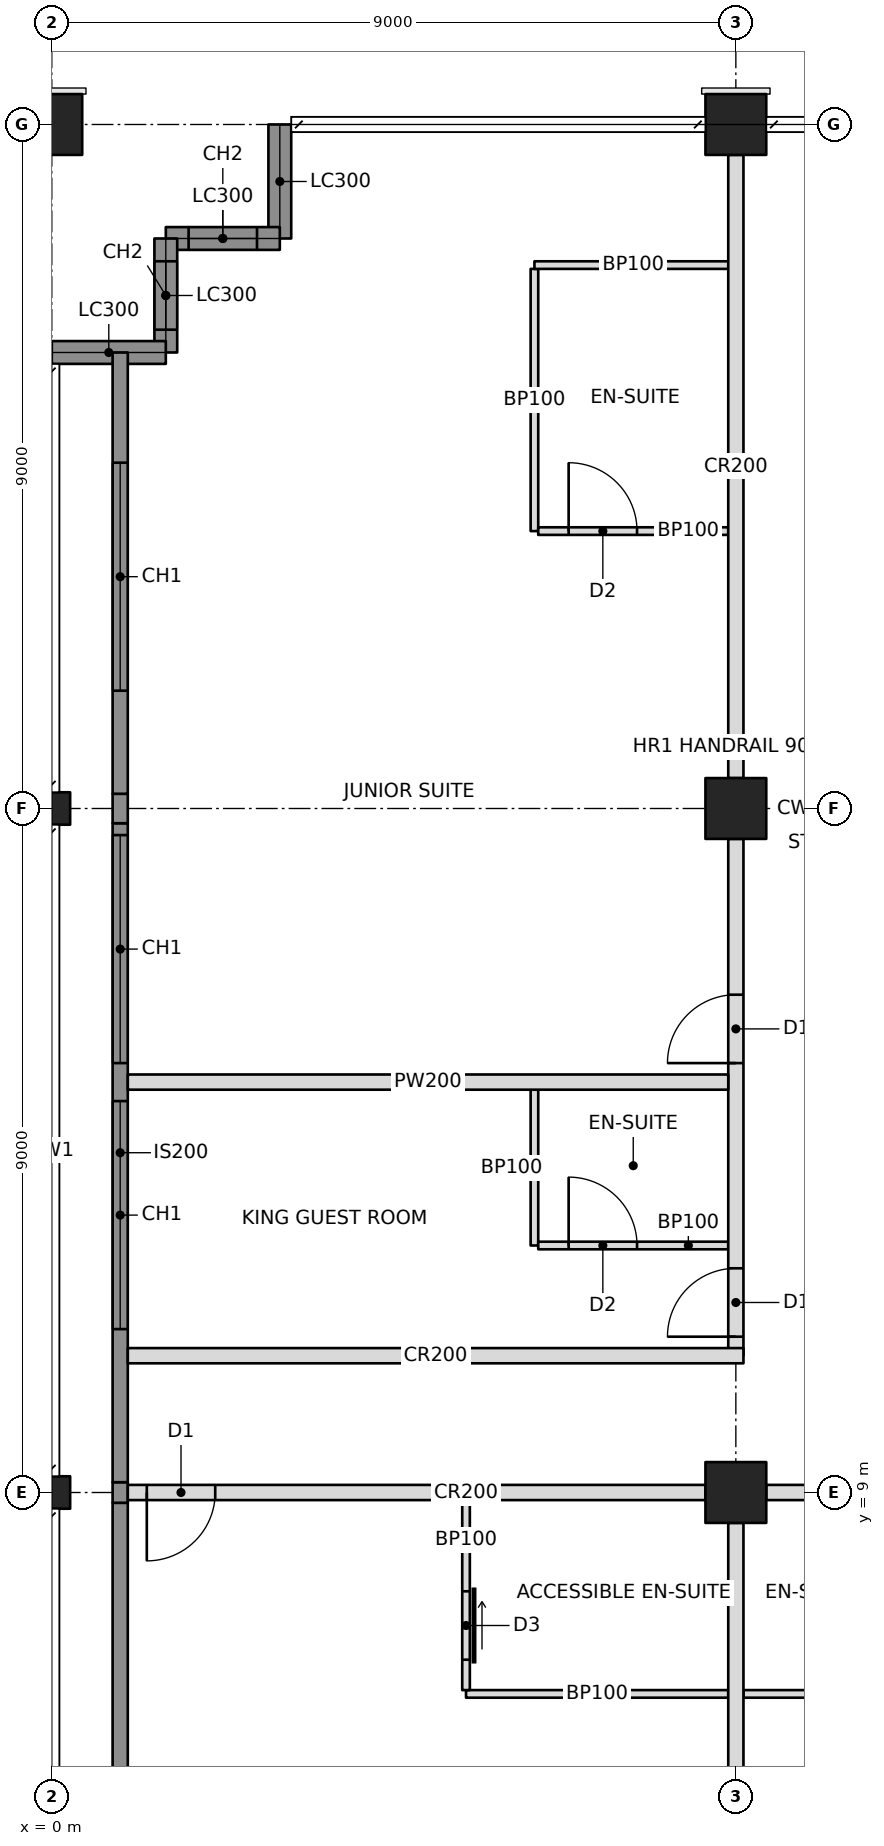
"""IFC4 building model, lengths in metres.
Left out: names, types, materials, properties, quantities, classifications, styles, units other than length and angle.
Written with IfcOpenShell. Run it as: python <this file> out.ifc"""

import sys

from ifc_helpers import new_model, si_unit, direction, frame, frame_2d, origin, origin_2d, place, context, subcontext, project, spatial, rectangle, hollow_rectangle, i_section, extrude, element, fill, save


model = new_model("IFC4")
c1 = context("Model", 3, precision=1e-05, world=origin(), true_north=direction((0.0, 1.0)))
c2 = subcontext(c1, "Body", "Model", "MODEL_VIEW")
j1 = project(units=[si_unit("LENGTHUNIT", "METRE"), si_unit("PLANEANGLEUNIT", "RADIAN")], contexts=[c1])
p1 = place(None, origin())
s1 = spatial("IfcSite", under=j1, at=p1, CompositionType="ELEMENT")
p2 = place(p1, origin())
s2 = spatial("IfcBuilding", under=s1, at=p2, CompositionType="ELEMENT")
p3 = place(p2, frame((0.0, 0.0, 211.4)))
s3 = spatial("IfcBuildingStorey", under=s2, at=p3, CompositionType="ELEMENT", Elevation=211.4)
for number, where, z_axis, x_axis in (
    (1, (0.0, 9.0, 0.0), (0.0, 0.0, 1.0), (0.0, 1.0, 0.0)),
    (2, (0.0, 18.0, 0.0), (0.0, 0.0, 1.0), (0.0, 1.0, 0.0)),
):
    element("IfcColumn", number, at=place(p3, frame(where, z_axis=z_axis, x_axis=x_axis)), inside=s3, PredefinedType="COLUMN", context=c2, shape_type="SweptSolid", body=[
        extrude(i_section(OverallWidth=0.427, OverallDepth=0.483, WebThickness=0.051, FlangeThickness=0.082, at=origin_2d()), origin(), (0.0, 0.0, 1.0), 3.4),
    ])
p4 = place(p3, frame((0.0, 27.0, 0.0), z_axis=(0.0, 0.0, 1.0), x_axis=(0.0, 1.0, 0.0)))
e3 = element("IfcColumn", 3, at=p4, inside=s3, PredefinedType="COLUMN", context=c2, shape_type="SweptSolid", body=[
    extrude(hollow_rectangle(XDim=0.8, YDim=0.8, WallThickness=0.06, at=origin_2d()), origin(), (0.0, 0.0, 1.0), 3.4),
])
for number, where, z_axis, x_axis in (
    (4, (9.0, 9.0, 0.0), (0.0, 0.0, 1.0), (1.0, 0.0, 0.0)),
    (5, (9.0, 18.0, 0.0), (0.0, 0.0, 1.0), (1.0, 0.0, 0.0)),
):
    element("IfcColumn", number, at=place(p3, frame(where, z_axis=z_axis, x_axis=x_axis)), inside=s3, PredefinedType="COLUMN", context=c2, shape_type="SweptSolid", body=[
        extrude(hollow_rectangle(XDim=0.8, YDim=0.8, WallThickness=0.05, at=origin_2d()), origin(), (0.0, 0.0, 1.0), 3.4),
    ])
p5 = place(p3, frame((9.0, 27.0, 0.0), z_axis=(0.0, 0.0, 1.0), x_axis=(1.0, 0.0, 0.0)))
e6 = element("IfcColumn", 6, at=p5, inside=s3, PredefinedType="COLUMN", context=c2, shape_type="SweptSolid", body=[
    extrude(hollow_rectangle(XDim=0.8, YDim=0.8, WallThickness=0.06, at=origin_2d()), origin(), (0.0, 0.0, 1.0), 3.4),
])
p6 = place(p3, frame((3.0, 27.0, 0.0), z_axis=(0.0, 0.0, 1.0), x_axis=(0.0, -1.0, 0.0)))
e7 = element("IfcWall", 7, at=p6, inside=s3, PredefinedType="SOLIDWALL", context=c2, shape_type="SweptSolid", body=[
    extrude(rectangle(XDim=1.5, YDim=0.3, at=frame_2d((0.75, 0.0))), origin(), (0.0, 0.0, 1.0), 2.42),
])
p7 = place(p3, frame((3.0, 25.5, 0.0), z_axis=(0.0, 0.0, 1.0), x_axis=(-1.0, 0.0, 0.0)))
e8 = element("IfcWall", 8, at=p7, inside=s3, PredefinedType="SOLIDWALL", context=c2, shape_type="SweptSolid", body=[
    extrude(rectangle(XDim=1.5, YDim=0.3, at=frame_2d((0.75, 0.0))), origin(), (0.0, 0.0, 1.0), 3.2),
])
p8 = place(p7, frame((0.3, 0.0, 0.6)))
e9 = element("IfcOpeningElement", 9, at=p8, cuts=e8, PredefinedType="OPENING", context=c2, shape_type="SweptSolid", body=[
    extrude(rectangle(XDim=0.9, YDim=2.2, at=frame_2d((0.45, 1.1))), frame((0.0, 0.16, 0.0), z_axis=(0.0, -1.0, 0.0), x_axis=(1.0, 0.0, 0.0)), (0.0, 0.0, 1.0), 0.32),
])
p9 = place(p3, frame((1.5, 25.5, 0.0), z_axis=(0.0, 0.0, 1.0), x_axis=(0.0, -1.0, 0.0)))
e10 = element("IfcWall", 10, at=p9, inside=s3, PredefinedType="SOLIDWALL", context=c2, shape_type="SweptSolid", body=[
    extrude(rectangle(XDim=1.5, YDim=0.3, at=frame_2d((0.75, 0.0))), origin(), (0.0, 0.0, 1.0), 3.2),
])
p10 = place(p9, frame((0.3, 0.0, 0.6)))
e11 = element("IfcOpeningElement", 11, at=p10, cuts=e10, PredefinedType="OPENING", context=c2, shape_type="SweptSolid", body=[
    extrude(rectangle(XDim=0.9, YDim=2.2, at=frame_2d((0.45, 1.1))), frame((0.0, 0.16, 0.0), z_axis=(0.0, -1.0, 0.0), x_axis=(1.0, 0.0, 0.0)), (0.0, 0.0, 1.0), 0.32),
])
p11 = place(p3, frame((1.5, 24.0, 0.0), z_axis=(0.0, 0.0, 1.0), x_axis=(-1.0, 0.0, 0.0)))
e12 = element("IfcWall", 12, at=p11, inside=s3, PredefinedType="SOLIDWALL", context=c2, shape_type="SweptSolid", body=[
    extrude(rectangle(XDim=1.5, YDim=0.3, at=frame_2d((0.75, 0.0))), origin(), (0.0, 0.0, 1.0), 2.42),
])
p12 = place(p3, frame((1.0, 9.0, 0.0), z_axis=(0.0, 0.0, 1.0), x_axis=(1.0, 0.0, 0.0)))
e13 = element("IfcWall", 13, at=p12, inside=s3, PredefinedType="PARTITIONING", context=c2, shape_type="SweptSolid", body=[
    extrude(rectangle(XDim=7.6, YDim=0.2, at=frame_2d((3.8, 0.0))), origin(), (0.0, 0.0, 1.0), 2.438),
])
p13 = place(p12, frame((0.25, 0.0, 0.0)))
e14 = element("IfcOpeningElement", 14, at=p13, cuts=e13, PredefinedType="OPENING", context=c2, shape_type="SweptSolid", body=[
    extrude(rectangle(XDim=0.9, YDim=2.1, at=frame_2d((0.45, 1.05))), frame((0.0, 0.11, 0.0), z_axis=(0.0, -1.0, 0.0), x_axis=(1.0, 0.0, 0.0)), (0.0, 0.0, 1.0), 0.22),
])
p14 = place(p3, frame((9.4, 9.0, 0.0), z_axis=(0.0, 0.0, 1.0), x_axis=(1.0, 0.0, 0.0)))
e15 = element("IfcWall", 15, at=p14, inside=s3, PredefinedType="PARTITIONING", context=c2, shape_type="SweptSolid", body=[
    extrude(rectangle(XDim=8.2, YDim=0.2, at=frame_2d((4.1, 0.0))), origin(), (0.0, 0.0, 1.0), 2.405),
])
p15 = place(p14, frame((2.95, 0.0, 0.0)))
e16 = element("IfcOpeningElement", 16, at=p15, cuts=e15, PredefinedType="OPENING", context=c2, shape_type="SweptSolid", body=[
    extrude(rectangle(XDim=0.9, YDim=2.1, at=frame_2d((0.45, 1.05))), frame((0.0, 0.11, 0.0), z_axis=(0.0, -1.0, 0.0), x_axis=(1.0, 0.0, 0.0)), (0.0, 0.0, 1.0), 0.22),
])
p16 = place(p14, frame((4.35, 0.0, 0.0)))
e17 = element("IfcOpeningElement", 17, at=p16, cuts=e15, PredefinedType="OPENING", context=c2, shape_type="SweptSolid", body=[
    extrude(rectangle(XDim=0.9, YDim=2.1, at=frame_2d((0.45, 1.05))), frame((0.0, 0.11, 0.0), z_axis=(0.0, -1.0, 0.0), x_axis=(1.0, 0.0, 0.0)), (0.0, 0.0, 1.0), 0.22),
])
p17 = place(p3, frame((9.0, 10.8, 0.0), z_axis=(0.0, 0.0, 1.0), x_axis=(0.0, 1.0, 0.0)))
e18 = element("IfcWall", 18, at=p17, inside=s3, PredefinedType="PARTITIONING", context=c2, shape_type="SweptSolid", body=[
    extrude(rectangle(XDim=6.8, YDim=0.2, at=frame_2d((3.4, 0.0))), origin(), (0.0, 0.0, 1.0), 2.405),
])
p18 = place(p17, frame((0.25, 0.0, 0.0)))
e19 = element("IfcOpeningElement", 19, at=p18, cuts=e18, PredefinedType="OPENING", context=c2, shape_type="SweptSolid", body=[
    extrude(rectangle(XDim=0.9, YDim=2.1, at=frame_2d((0.45, 1.05))), frame((0.0, 0.11, 0.0), z_axis=(0.0, -1.0, 0.0), x_axis=(1.0, 0.0, 0.0)), (0.0, 0.0, 1.0), 0.22),
])
p19 = place(p17, frame((3.85, 0.0, 0.0)))
e20 = element("IfcOpeningElement", 20, at=p19, cuts=e18, PredefinedType="OPENING", context=c2, shape_type="SweptSolid", body=[
    extrude(rectangle(XDim=0.9, YDim=2.1, at=frame_2d((0.45, 1.05))), frame((0.0, 0.11, 0.0), z_axis=(0.0, -1.0, 0.0), x_axis=(1.0, 0.0, 0.0)), (0.0, 0.0, 1.0), 0.22),
])
p20 = place(p3, frame((9.0, 18.4, 0.0), z_axis=(0.0, 0.0, 1.0), x_axis=(0.0, 1.0, 0.0)))
e21 = element("IfcWall", 21, at=p20, inside=s3, PredefinedType="PARTITIONING", context=c2, shape_type="SweptSolid", body=[
    extrude(rectangle(XDim=8.2, YDim=0.2, at=frame_2d((4.1, 0.0))), origin(), (0.0, 0.0, 1.0), 2.405),
])
p21 = place(p3, frame((1.0, 10.8, 0.0), z_axis=(0.0, 0.0, 1.0), x_axis=(1.0, 0.0, 0.0)))
e22 = element("IfcWall", 22, at=p21, inside=s3, PredefinedType="PARTITIONING", context=c2, shape_type="SweptSolid", body=[
    extrude(rectangle(XDim=8.1, YDim=0.2, at=frame_2d((4.05, 0.0))), origin(), (0.0, 0.0, 1.0), 2.404),
])
p22 = place(p3, frame((9.0, 8.6, 0.0), z_axis=(0.0, 0.0, 1.0), x_axis=(0.0, -1.0, 0.0)))
e23 = element("IfcWall", 23, at=p22, inside=s3, PredefinedType="PARTITIONING", context=c2, shape_type="SweptSolid", body=[
    extrude(rectangle(XDim=7.6, YDim=0.2, at=frame_2d((3.8, 0.0))), origin(), (0.0, 0.0, 1.0), 2.438),
])
p23 = place(p3, frame((5.45, 6.35, 0.0), z_axis=(0.0, 0.0, 1.0), x_axis=(1.0, 0.0, 0.0)))
e24 = element("IfcWall", 24, at=p23, inside=s3, PredefinedType="PARTITIONING", context=c2, shape_type="SweptSolid", body=[
    extrude(rectangle(XDim=3.45, YDim=0.1, at=frame_2d((1.725, 0.0))), origin(), (0.0, 0.0, 1.0), 2.438),
])
p24 = place(p3, frame((5.45, 8.9, 0.0), z_axis=(0.0, 0.0, 1.0), x_axis=(0.0, -1.0, 0.0)))
e25 = element("IfcWall", 25, at=p24, inside=s3, PredefinedType="PARTITIONING", context=c2, shape_type="SweptSolid", body=[
    extrude(rectangle(XDim=2.5, YDim=0.1, at=frame_2d((1.25, 0.0))), origin(), (0.0, 0.0, 1.0), 2.438),
])
p25 = place(p24, frame((1.2, 0.0, 0.0)))
e26 = element("IfcOpeningElement", 26, at=p25, cuts=e25, PredefinedType="OPENING", context=c2, shape_type="SweptSolid", body=[
    extrude(rectangle(XDim=0.9, YDim=2.1, at=frame_2d((0.45, 1.05))), frame((0.0, 0.06, 0.0), z_axis=(0.0, -1.0, 0.0), x_axis=(1.0, 0.0, 0.0)), (0.0, 0.0, 1.0), 0.12),
])
p26 = place(p3, frame((9.1, 6.35, 0.0), z_axis=(0.0, 0.0, 1.0), x_axis=(1.0, 0.0, 0.0)))
e27 = element("IfcWall", 27, at=p26, inside=s3, PredefinedType="PARTITIONING", context=c2, shape_type="SweptSolid", body=[
    extrude(rectangle(XDim=2.95, YDim=0.1, at=frame_2d((1.475, 0.0))), origin(), (0.0, 0.0, 1.0), 2.438),
])
p27 = place(p3, frame((8.9, 14.4, 0.0), z_axis=(0.0, 0.0, 1.0), x_axis=(-1.0, 0.0, 0.0)))
e28 = element("IfcWall", 28, at=p27, inside=s3, PredefinedType="PARTITIONING", context=c2, shape_type="SweptSolid", body=[
    extrude(rectangle(XDim=7.9, YDim=0.2, at=frame_2d((3.95, 0.0))), origin(), (0.0, 0.0, 1.0), 2.404),
])
p28 = place(p3, frame((6.35, 12.25, 0.0), z_axis=(0.0, 0.0, 1.0), x_axis=(0.0, 1.0, 0.0)))
e29 = element("IfcWall", 29, at=p28, inside=s3, PredefinedType="PARTITIONING", context=c2, shape_type="SweptSolid", body=[
    extrude(rectangle(XDim=2.05, YDim=0.1, at=frame_2d((1.025, 0.0))), origin(), (0.0, 0.0, 1.0), 3.2),
])
p29 = place(p3, frame((8.9, 12.25, 0.0), z_axis=(0.0, 0.0, 1.0), x_axis=(-1.0, 0.0, 0.0)))
e30 = element("IfcWall", 30, at=p29, inside=s3, PredefinedType="PARTITIONING", context=c2, shape_type="SweptSolid", body=[
    extrude(rectangle(XDim=2.5, YDim=0.1, at=frame_2d((1.25, 0.0))), origin(), (0.0, 0.0, 1.0), 2.404),
])
p30 = place(p29, frame((1.2, 0.0, 0.0)))
e31 = element("IfcOpeningElement", 31, at=p30, cuts=e30, PredefinedType="OPENING", context=c2, shape_type="SweptSolid", body=[
    extrude(rectangle(XDim=0.9, YDim=2.1, at=frame_2d((0.45, 1.05))), frame((0.0, 0.06, 0.0), z_axis=(0.0, -1.0, 0.0), x_axis=(1.0, 0.0, 0.0)), (0.0, 0.0, 1.0), 0.12),
])
p31 = place(p3, frame((6.35, 21.65, 0.0), z_axis=(0.0, 0.0, 1.0), x_axis=(0.0, 1.0, 0.0)))
e32 = element("IfcWall", 32, at=p31, inside=s3, PredefinedType="PARTITIONING", context=c2, shape_type="SweptSolid", body=[
    extrude(rectangle(XDim=3.45, YDim=0.1, at=frame_2d((1.725, 0.0))), origin(), (0.0, 0.0, 1.0), 3.2),
])
p32 = place(p3, frame((8.9, 21.65, 0.0), z_axis=(0.0, 0.0, 1.0), x_axis=(-1.0, 0.0, 0.0)))
e33 = element("IfcWall", 33, at=p32, inside=s3, PredefinedType="PARTITIONING", context=c2, shape_type="SweptSolid", body=[
    extrude(rectangle(XDim=2.5, YDim=0.1, at=frame_2d((1.25, 0.0))), origin(), (0.0, 0.0, 1.0), 2.404),
])
p33 = place(p32, frame((1.2, 0.0, 0.0)))
e34 = element("IfcOpeningElement", 34, at=p33, cuts=e33, PredefinedType="OPENING", context=c2, shape_type="SweptSolid", body=[
    extrude(rectangle(XDim=0.9, YDim=2.1, at=frame_2d((0.45, 1.05))), frame((0.0, 0.06, 0.0), z_axis=(0.0, -1.0, 0.0), x_axis=(1.0, 0.0, 0.0)), (0.0, 0.0, 1.0), 0.12),
])
p34 = place(p3, frame((6.35, 25.15, 0.0), z_axis=(0.0, 0.0, 1.0), x_axis=(1.0, 0.0, 0.0)))
e35 = element("IfcWall", 35, at=p34, inside=s3, PredefinedType="PARTITIONING", context=c2, shape_type="SweptSolid", body=[
    extrude(rectangle(XDim=2.6, YDim=0.1, at=frame_2d((1.3, 0.0))), origin(), (0.0, 0.0, 1.0), 2.404),
])
p35 = place(p3, frame((0.9, 4.607, 0.0), z_axis=(0.0, 0.0, 1.0), x_axis=(0.0, 1.0, 0.0)))
e36 = element("IfcWall", 36, at=p35, inside=s3, PredefinedType="SOLIDWALL", context=c2, shape_type="SweptSolid", body=[
    extrude(rectangle(XDim=4.257, YDim=0.2, at=frame_2d((2.129, 0.0))), origin(), (0.0, 0.0, 1.0), 3.2),
])
p36 = place(p3, frame((0.9, 8.865, 0.0), z_axis=(0.0, 0.0, 1.0), x_axis=(0.0, 1.0, 0.0)))
e37 = element("IfcWall", 37, at=p36, inside=s3, PredefinedType="SOLIDWALL", context=c2, shape_type="SweptSolid", body=[
    extrude(rectangle(XDim=0.271, YDim=0.2, at=frame_2d((0.135, 0.0))), origin(), (0.0, 0.0, 1.0), 2.438),
])
p37 = place(p3, frame((0.9, 9.135, 0.0), z_axis=(0.0, 0.0, 1.0), x_axis=(0.0, 1.0, 0.0)))
e38 = element("IfcWall", 38, at=p37, inside=s3, PredefinedType="SOLIDWALL", context=c2, shape_type="SweptSolid", body=[
    extrude(rectangle(XDim=8.671, YDim=0.2, at=frame_2d((4.335, 0.0))), origin(), (0.0, 0.0, 1.0), 3.2),
])
p38 = place(p37, frame((2.015, 0.0, 0.6)))
e39 = element("IfcOpeningElement", 39, at=p38, cuts=e38, PredefinedType="OPENING", context=c2, shape_type="SweptSolid", body=[
    extrude(rectangle(XDim=3.0, YDim=2.2, at=frame_2d((1.5, 1.1))), frame((0.0, 0.11, 0.0), z_axis=(0.0, -1.0, 0.0), x_axis=(1.0, 0.0, 0.0)), (0.0, 0.0, 1.0), 0.22),
])
p39 = place(p37, frame((5.515, 0.0, 0.6)))
e40 = element("IfcOpeningElement", 40, at=p39, cuts=e38, PredefinedType="OPENING", context=c2, shape_type="SweptSolid", body=[
    extrude(rectangle(XDim=3.0, YDim=2.2, at=frame_2d((1.5, 1.1))), frame((0.0, 0.11, 0.0), z_axis=(0.0, -1.0, 0.0), x_axis=(1.0, 0.0, 0.0)), (0.0, 0.0, 1.0), 0.22),
])
p40 = place(p3, frame((0.9, 17.806, 0.0), z_axis=(0.0, 0.0, 1.0), x_axis=(0.0, 1.0, 0.0)))
e41 = element("IfcWall", 41, at=p40, inside=s3, PredefinedType="SOLIDWALL", context=c2, shape_type="SweptSolid", body=[
    extrude(rectangle(XDim=0.388, YDim=0.2, at=frame_2d((0.194, 0.0))), origin(), (0.0, 0.0, 1.0), 2.404),
])
p41 = place(p3, frame((0.9, 18.194, 0.0), z_axis=(0.0, 0.0, 1.0), x_axis=(0.0, 1.0, 0.0)))
e42 = element("IfcWall", 42, at=p41, inside=s3, PredefinedType="SOLIDWALL", context=c2, shape_type="SweptSolid", body=[
    extrude(rectangle(XDim=5.806, YDim=0.2, at=frame_2d((2.903, 0.0))), origin(), (0.0, 0.0, 1.0), 3.2),
])
p42 = place(p41, frame((1.356, 0.0, 0.6)))
e43 = element("IfcOpeningElement", 43, at=p42, cuts=e42, PredefinedType="OPENING", context=c2, shape_type="SweptSolid", body=[
    extrude(rectangle(XDim=3.0, YDim=2.2, at=frame_2d((1.5, 1.1))), frame((0.0, 0.11, 0.0), z_axis=(0.0, -1.0, 0.0), x_axis=(1.0, 0.0, 0.0)), (0.0, 0.0, 1.0), 0.22),
])
p43 = place(p8, origin())
e44 = element("IfcWindow", 44, at=p43, inside=s3, PartitioningType="SINGLE_PANEL", PredefinedType="WINDOW", context=c2, shape_type="SweptSolid", body=[
    extrude(rectangle(XDim=0.9, YDim=2.2, at=frame_2d((0.45, 1.1))), frame((0.0, 0.03, 0.0), z_axis=(0.0, -1.0, 0.0), x_axis=(1.0, 0.0, 0.0)), (0.0, 0.0, 1.0), 0.06),
])
fill(e9, e44)
p44 = place(p10, origin())
e45 = element("IfcWindow", 45, at=p44, inside=s3, PartitioningType="SINGLE_PANEL", PredefinedType="WINDOW", context=c2, shape_type="SweptSolid", body=[
    extrude(rectangle(XDim=0.9, YDim=2.2, at=frame_2d((0.45, 1.1))), frame((0.0, 0.03, 0.0), z_axis=(0.0, -1.0, 0.0), x_axis=(1.0, 0.0, 0.0)), (0.0, 0.0, 1.0), 0.06),
])
fill(e11, e45)
p45 = place(p38, origin())
e46 = element("IfcWindow", 46, at=p45, inside=s3, PartitioningType="TRIPLE_PANEL_VERTICAL", PredefinedType="WINDOW", context=c2, shape_type="SweptSolid", body=[
    extrude(rectangle(XDim=3.0, YDim=2.2, at=frame_2d((1.5, 1.1))), frame((0.0, 0.03, 0.0), z_axis=(0.0, -1.0, 0.0), x_axis=(1.0, 0.0, 0.0)), (0.0, 0.0, 1.0), 0.06),
])
fill(e39, e46)
p46 = place(p39, origin())
e47 = element("IfcWindow", 47, at=p46, inside=s3, PartitioningType="TRIPLE_PANEL_VERTICAL", PredefinedType="WINDOW", context=c2, shape_type="SweptSolid", body=[
    extrude(rectangle(XDim=3.0, YDim=2.2, at=frame_2d((1.5, 1.1))), frame((0.0, 0.03, 0.0), z_axis=(0.0, -1.0, 0.0), x_axis=(1.0, 0.0, 0.0)), (0.0, 0.0, 1.0), 0.06),
])
fill(e40, e47)
p47 = place(p42, origin())
e48 = element("IfcWindow", 48, at=p47, inside=s3, PartitioningType="TRIPLE_PANEL_VERTICAL", PredefinedType="WINDOW", context=c2, shape_type="SweptSolid", body=[
    extrude(rectangle(XDim=3.0, YDim=2.2, at=frame_2d((1.5, 1.1))), frame((0.0, 0.03, 0.0), z_axis=(0.0, -1.0, 0.0), x_axis=(1.0, 0.0, 0.0)), (0.0, 0.0, 1.0), 0.06),
])
fill(e43, e48)
p48 = place(p25, origin())
e49 = element("IfcDoor", 49, at=p48, inside=s3, OperationType="SLIDING_TO_LEFT", PredefinedType="DOOR", context=c2, shape_type="SweptSolid", body=[
    extrude(rectangle(XDim=0.9, YDim=2.1, at=frame_2d((0.45, 1.05))), frame((0.0, 0.025, 0.0), z_axis=(0.0, -1.0, 0.0), x_axis=(1.0, 0.0, 0.0)), (0.0, 0.0, 1.0), 0.05),
])
fill(e26, e49)
p49 = place(p13, frame((0.9, 0.0, 0.0), z_axis=(0.0, 0.0, 1.0), x_axis=(-1.0, 0.0, 0.0)))
e50 = element("IfcDoor", 50, at=p49, inside=s3, OperationType="SINGLE_SWING_RIGHT", PredefinedType="DOOR", context=c2, shape_type="SweptSolid", body=[
    extrude(rectangle(XDim=0.9, YDim=2.1, at=frame_2d((0.45, 1.05))), frame((0.0, 0.025, 0.0), z_axis=(0.0, -1.0, 0.0), x_axis=(1.0, 0.0, 0.0)), (0.0, 0.0, 1.0), 0.05),
])
fill(e14, e50)
p50 = place(p30, frame((0.9, 0.0, 0.0), z_axis=(0.0, 0.0, 1.0), x_axis=(-1.0, 0.0, 0.0)))
e51 = element("IfcDoor", 51, at=p50, inside=s3, OperationType="SINGLE_SWING_LEFT", PredefinedType="DOOR", context=c2, shape_type="SweptSolid", body=[
    extrude(rectangle(XDim=0.9, YDim=2.1, at=frame_2d((0.45, 1.05))), frame((0.0, 0.025, 0.0), z_axis=(0.0, -1.0, 0.0), x_axis=(1.0, 0.0, 0.0)), (0.0, 0.0, 1.0), 0.05),
])
fill(e31, e51)
p51 = place(p18, origin())
e52 = element("IfcDoor", 52, at=p51, inside=s3, OperationType="SINGLE_SWING_LEFT", PredefinedType="DOOR", context=c2, shape_type="SweptSolid", body=[
    extrude(rectangle(XDim=0.9, YDim=2.1, at=frame_2d((0.45, 1.05))), frame((0.0, 0.025, 0.0), z_axis=(0.0, -1.0, 0.0), x_axis=(1.0, 0.0, 0.0)), (0.0, 0.0, 1.0), 0.05),
])
fill(e19, e52)
p52 = place(p33, frame((0.9, 0.0, 0.0), z_axis=(0.0, 0.0, 1.0), x_axis=(-1.0, 0.0, 0.0)))
e53 = element("IfcDoor", 53, at=p52, inside=s3, OperationType="SINGLE_SWING_LEFT", PredefinedType="DOOR", context=c2, shape_type="SweptSolid", body=[
    extrude(rectangle(XDim=0.9, YDim=2.1, at=frame_2d((0.45, 1.05))), frame((0.0, 0.025, 0.0), z_axis=(0.0, -1.0, 0.0), x_axis=(1.0, 0.0, 0.0)), (0.0, 0.0, 1.0), 0.05),
])
fill(e34, e53)
p53 = place(p19, origin())
e54 = element("IfcDoor", 54, at=p53, inside=s3, OperationType="SINGLE_SWING_LEFT", PredefinedType="DOOR", context=c2, shape_type="SweptSolid", body=[
    extrude(rectangle(XDim=0.9, YDim=2.1, at=frame_2d((0.45, 1.05))), frame((0.0, 0.025, 0.0), z_axis=(0.0, -1.0, 0.0), x_axis=(1.0, 0.0, 0.0)), (0.0, 0.0, 1.0), 0.05),
])
fill(e20, e54)
save(model, sys.argv[1])
